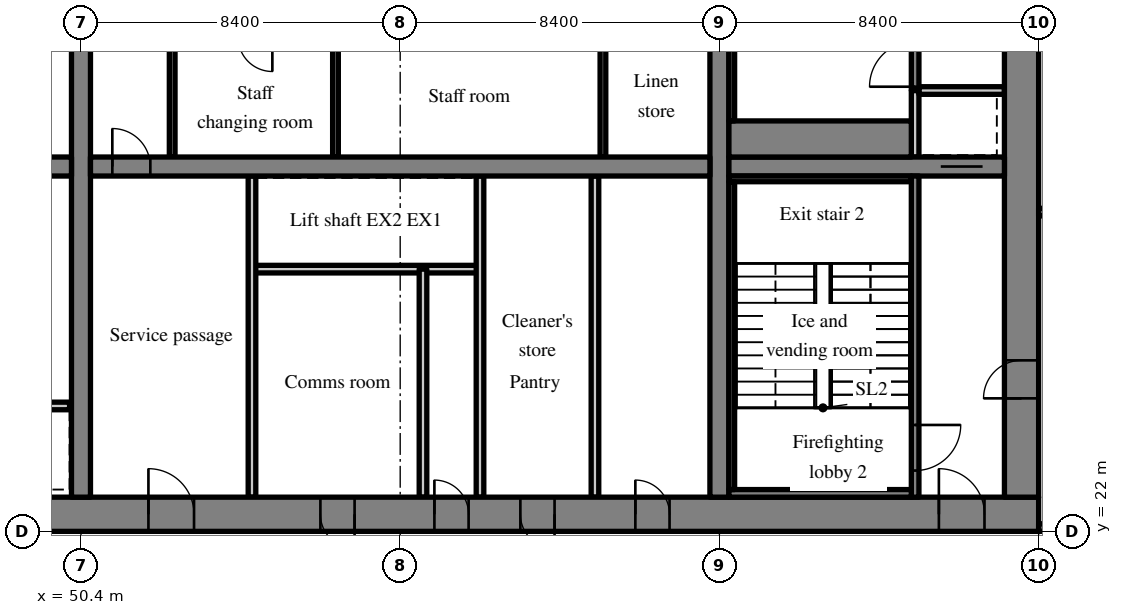
"""IFC4 building model, lengths in metres.
Left out: names, types, materials, properties, quantities, classifications, styles, units other than length and angle.
Written with IfcOpenShell. Run it as: python <this file> out.ifc"""

import sys

from ifc_helpers import new_model, si_unit, direction, frame, frame_2d, origin, place, context, subcontext, project, spatial, rectangle, extrude, source, transform, mapped, element, fill, save


model = new_model("IFC4")
c1 = context("Model", 3, precision=1e-05, world=origin(), true_north=direction((0.0, 1.0)))
c2 = subcontext(c1, "Body", "Model", "MODEL_VIEW")
j1 = project(units=[si_unit("LENGTHUNIT", "METRE"), si_unit("PLANEANGLEUNIT", "RADIAN")], contexts=[c1])
p1 = place(None, origin())
s1 = spatial("IfcSite", under=j1, at=p1, CompositionType="ELEMENT")
p2 = place(p1, origin())
s2 = spatial("IfcBuilding", under=s1, at=p2, CompositionType="ELEMENT")
p3 = place(p2, frame((0.0, 0.0, 137.0)))
s3 = spatial("IfcBuildingStorey", under=s2, at=p3, CompositionType="ELEMENT", Elevation=137.0)
m1 = source(origin(), c2, "Body", "SweptSolid", [
    extrude(rectangle(XDim=50.4, YDim=0.9, at=frame_2d((25.2, 0.0))), origin(), (0.0, 0.0, 1.0), 3.52),
])
p4 = place(p3, frame((25.2, 22.45, 0.0), z_axis=(0.0, 0.0, 1.0), x_axis=(1.0, 0.0, 0.0)))
e1 = element("IfcWall", 1, at=p4, inside=s3, PredefinedType="SHEAR", context=c2, shape_type="MappedRepresentation", body=[
    mapped(m1, transform((0.0, 0.0, 0.0), scale=1.0)),
])
m2 = source(origin(), c2, "Body", "SweptSolid", [
    extrude(rectangle(XDim=1.8, YDim=2.1, at=frame_2d((0.9, 1.05))), frame((0.0, 0.46, 0.0), z_axis=(0.0, -1.0, 0.0), x_axis=(1.0, 0.0, 0.0)), (0.0, 0.0, 1.0), 0.92),
])
p5 = place(p4, frame((15.9, 0.0, 0.0)))
e2 = element("IfcOpeningElement", 2, at=p5, cuts=e1, PredefinedType="OPENING", context=c2, shape_type="MappedRepresentation", body=[
    mapped(m2, transform((0.0, 0.0, 0.0), scale=1.0)),
])
m3 = source(origin(), c2, "Body", "SweptSolid", [
    extrude(rectangle(XDim=1.2, YDim=2.1, at=frame_2d((0.6, 1.05))), frame((0.0, 0.46, 0.0), z_axis=(0.0, -1.0, 0.0), x_axis=(1.0, 0.0, 0.0)), (0.0, 0.0, 1.0), 0.92),
])
p6 = place(p4, frame((26.975, 0.0, 0.0)))
e3 = element("IfcOpeningElement", 3, at=p6, cuts=e1, PredefinedType="OPENING", context=c2, shape_type="MappedRepresentation", body=[
    mapped(m3, transform((0.0, 0.0, 0.0), scale=1.0)),
])
m4 = source(origin(), c2, "Body", "SweptSolid", [
    extrude(rectangle(XDim=0.9, YDim=2.1, at=frame_2d((0.45, 1.05))), frame((0.0, 0.46, 0.0), z_axis=(0.0, -1.0, 0.0), x_axis=(1.0, 0.0, 0.0)), (0.0, 0.0, 1.0), 0.92),
])
p7 = place(p4, frame((34.5, 0.0, 0.0)))
e4 = element("IfcOpeningElement", 4, at=p7, cuts=e1, PredefinedType="OPENING", context=c2, shape_type="MappedRepresentation", body=[
    mapped(m4, transform((0.0, 0.0, 0.0), scale=1.0)),
])
p8 = place(p4, frame((31.5, 0.0, 0.0)))
e5 = element("IfcOpeningElement", 5, at=p8, cuts=e1, PredefinedType="OPENING", context=c2, shape_type="MappedRepresentation", body=[
    mapped(m4, transform((0.0, 0.0, 0.0), scale=1.0)),
])
p9 = place(p4, frame((39.788, 0.0, 0.0)))
e6 = element("IfcOpeningElement", 6, at=p9, cuts=e1, PredefinedType="OPENING", context=c2, shape_type="MappedRepresentation", body=[
    mapped(m4, transform((0.0, 0.0, 0.0), scale=1.0)),
])
p10 = place(p4, frame((36.762, 0.0, 0.0)))
e7 = element("IfcOpeningElement", 7, at=p10, cuts=e1, PredefinedType="OPENING", context=c2, shape_type="MappedRepresentation", body=[
    mapped(m4, transform((0.0, 0.0, 0.0), scale=1.0)),
])
p11 = place(p4, frame((6.45, 0.0, 0.0)))
e8 = element("IfcOpeningElement", 8, at=p11, cuts=e1, PredefinedType="OPENING", context=c2, shape_type="MappedRepresentation", body=[
    mapped(m3, transform((0.0, 0.0, 0.0), scale=1.0)),
])
p12 = place(p4, frame((47.775, 0.0, 0.0)))
e9 = element("IfcOpeningElement", 9, at=p12, cuts=e1, PredefinedType="OPENING", context=c2, shape_type="MappedRepresentation", body=[
    mapped(m3, transform((0.0, 0.0, 0.0), scale=1.0)),
])
m5 = source(origin(), c2, "Body", "SweptSolid", [
    extrude(rectangle(XDim=18.2, YDim=0.9, at=frame_2d((9.1, 0.0))), origin(), (0.0, 0.0, 1.0), 3.52),
])
p13 = place(p3, frame((75.15, 22.9, 0.0), z_axis=(0.0, 0.0, 1.0), x_axis=(0.0, 1.0, 0.0)))
e10 = element("IfcWall", 10, at=p13, inside=s3, PredefinedType="SHEAR", context=c2, shape_type="MappedRepresentation", body=[
    mapped(m5, transform((0.0, 0.0, 0.0), scale=1.0)),
])
m6 = source(origin(), c2, "Body", "SweptSolid", [
    extrude(rectangle(XDim=1.0, YDim=2.1, at=frame_2d((0.5, 1.05))), frame((0.0, 0.46, 0.0), z_axis=(0.0, -1.0, 0.0), x_axis=(1.0, 0.0, 0.0)), (0.0, 0.0, 1.0), 0.92),
])
p14 = place(p13, frame((2.6, 0.0, 0.0)))
e11 = element("IfcOpeningElement", 11, at=p14, cuts=e10, PredefinedType="OPENING", context=c2, shape_type="MappedRepresentation", body=[
    mapped(m6, transform((0.0, 0.0, 0.0), scale=1.0)),
])
p15 = place(p13, frame((12.5, 0.0, 0.0)))
e12 = element("IfcOpeningElement", 12, at=p15, cuts=e10, PredefinedType="OPENING", context=c2, shape_type="MappedRepresentation", body=[
    mapped(m3, transform((0.0, 0.0, 0.0), scale=1.0)),
])
m7 = source(origin(), c2, "Body", "SweptSolid", [
    extrude(rectangle(XDim=18.2, YDim=0.5, at=frame_2d((9.1, 0.0))), origin(), (0.0, 0.0, 1.0), 3.52),
])
p16 = place(p3, frame((50.4, 22.9, 0.0), z_axis=(0.0, 0.0, 1.0), x_axis=(0.0, 1.0, 0.0)))
e13 = element("IfcWall", 13, at=p16, inside=s3, PredefinedType="SHEAR", context=c2, shape_type="MappedRepresentation", body=[
    mapped(m7, transform((0.0, 0.0, 0.0), scale=1.0)),
])
m8 = source(origin(), c2, "Body", "SweptSolid", [
    extrude(rectangle(XDim=1.1, YDim=2.1, at=frame_2d((0.55, 1.05))), frame((0.0, 0.26, 0.0), z_axis=(0.0, -1.0, 0.0), x_axis=(1.0, 0.0, 0.0)), (0.0, 0.0, 1.0), 0.52),
])
p17 = place(p16, frame((12.55, 0.0, 0.0)))
e14 = element("IfcOpeningElement", 14, at=p17, cuts=e13, PredefinedType="OPENING", context=c2, shape_type="MappedRepresentation", body=[
    mapped(m8, transform((0.0, 0.0, 0.0), scale=1.0)),
])
p18 = place(p3, frame((67.2, 22.9, 0.0), z_axis=(0.0, 0.0, 1.0), x_axis=(0.0, 1.0, 0.0)))
e15 = element("IfcWall", 15, at=p18, inside=s3, PredefinedType="SHEAR", context=c2, shape_type="MappedRepresentation", body=[
    mapped(m7, transform((0.0, 0.0, 0.0), scale=1.0)),
])
m9 = source(origin(), c2, "Body", "SweptSolid", [
    extrude(rectangle(XDim=16.3, YDim=0.5, at=frame_2d((8.15, 0.0))), origin(), (0.0, 0.0, 1.0), 3.52),
])
p19 = place(p3, frame((33.85, 31.6, 0.0), z_axis=(0.0, 0.0, 1.0), x_axis=(1.0, 0.0, 0.0)))
e16 = element("IfcWall", 16, at=p19, inside=s3, PredefinedType="SHEAR", context=c2, shape_type="MappedRepresentation", body=[
    mapped(m9, transform((0.0, 0.0, 0.0), scale=1.0)),
])
m10 = source(origin(), c2, "Body", "SweptSolid", [
    extrude(rectangle(XDim=1.0, YDim=2.1, at=frame_2d((0.5, 1.05))), frame((0.0, 0.26, 0.0), z_axis=(0.0, -1.0, 0.0), x_axis=(1.0, 0.0, 0.0)), (0.0, 0.0, 1.0), 0.52),
])
p20 = place(p19, frame((14.725, 0.0, 0.0)))
e17 = element("IfcOpeningElement", 17, at=p20, cuts=e16, PredefinedType="OPENING", context=c2, shape_type="MappedRepresentation", body=[
    mapped(m10, transform((0.0, 0.0, 0.0), scale=1.0)),
])
m11 = source(origin(), c2, "Body", "SweptSolid", [
    extrude(rectangle(XDim=16.3, YDim=0.5, at=frame_2d((8.15, 0.0))), origin(), (0.0, 0.0, 1.0), 3.52),
])
p21 = place(p3, frame((50.65, 31.6, 0.0), z_axis=(0.0, 0.0, 1.0), x_axis=(1.0, 0.0, 0.0)))
e18 = element("IfcWall", 18, at=p21, inside=s3, PredefinedType="SHEAR", context=c2, shape_type="MappedRepresentation", body=[
    mapped(m11, transform((0.0, 0.0, 0.0), scale=1.0)),
])
p22 = place(p21, frame((0.575, 0.0, 0.0)))
e19 = element("IfcOpeningElement", 19, at=p22, cuts=e18, PredefinedType="OPENING", context=c2, shape_type="MappedRepresentation", body=[
    mapped(m10, transform((0.0, 0.0, 0.0), scale=1.0)),
])
m12 = source(origin(), c2, "Body", "SweptSolid", [
    extrude(rectangle(XDim=7.25, YDim=0.5, at=frame_2d((3.625, 0.0))), origin(), (0.0, 0.0, 1.0), 3.52),
])
p23 = place(p3, frame((67.45, 31.6, 0.0), z_axis=(0.0, 0.0, 1.0), x_axis=(1.0, 0.0, 0.0)))
e20 = element("IfcWall", 20, at=p23, inside=s3, PredefinedType="SHEAR", context=c2, shape_type="MappedRepresentation", body=[
    mapped(m12, transform((0.0, 0.0, 0.0), scale=1.0)),
])
p24 = place(p23, frame((5.575, 0.0, 0.0)))
e21 = element("IfcOpeningElement", 21, at=p24, cuts=e20, PredefinedType="OPENING", context=c2, shape_type="MappedRepresentation", body=[
    mapped(m8, transform((0.0, 0.0, 0.0), scale=1.0)),
])
m13 = source(origin(), c2, "Body", "SweptSolid", [
    extrude(rectangle(XDim=6.0, YDim=0.2, at=frame_2d((3.0, 0.0))), origin(), (0.0, 0.0, 1.0), 3.52),
])
p25 = place(p3, frame((44.1, 25.3, 0.0), z_axis=(0.0, 0.0, 1.0), x_axis=(1.0, 0.0, 0.0)))
e22 = element("IfcWall", 22, at=p25, inside=s3, PredefinedType="SOLIDWALL", context=c2, shape_type="MappedRepresentation", body=[
    mapped(m13, transform((0.0, 0.0, 0.0), scale=1.0)),
])
m14 = source(origin(), c2, "Body", "SweptSolid", [
    extrude(rectangle(XDim=1.1, YDim=2.1, at=frame_2d((0.55, 1.05))), frame((0.0, 0.11, 0.0), z_axis=(0.0, -1.0, 0.0), x_axis=(1.0, 0.0, 0.0)), (0.0, 0.0, 1.0), 0.22),
])
p26 = place(p25, frame((0.95, 0.0, 0.0)))
e23 = element("IfcOpeningElement", 23, at=p26, cuts=e22, PredefinedType="OPENING", context=c2, shape_type="MappedRepresentation", body=[
    mapped(m14, transform((0.0, 0.0, 0.0), scale=1.0)),
])
p27 = place(p25, frame((3.95, 0.0, 0.0)))
e24 = element("IfcOpeningElement", 24, at=p27, cuts=e22, PredefinedType="OPENING", context=c2, shape_type="MappedRepresentation", body=[
    mapped(m14, transform((0.0, 0.0, 0.0), scale=1.0)),
])
p28 = place(p3, frame((60.9, 28.9, 0.0), z_axis=(0.0, 0.0, 1.0), x_axis=(-1.0, 0.0, 0.0)))
e25 = element("IfcWall", 25, at=p28, inside=s3, PredefinedType="SOLIDWALL", context=c2, shape_type="MappedRepresentation", body=[
    mapped(m13, transform((0.0, 0.0, 0.0), scale=1.0)),
])
m15 = source(origin(), c2, "Body", "SweptSolid", [
    extrude(rectangle(XDim=8.45, YDim=0.2, at=frame_2d((4.225, 0.0))), origin(), (0.0, 0.0, 1.0), 3.52),
])
for number, where, z_axis, x_axis in (
    (26, (54.9, 22.9, 0.0), (0.0, 0.0, 1.0), (0.0, 1.0, 0.0)),
    (27, (60.9, 22.9, 0.0), (0.0, 0.0, 1.0), (0.0, 1.0, 0.0)),
):
    element("IfcWall", number, at=place(p3, frame(where, z_axis=z_axis, x_axis=x_axis)), inside=s3, PredefinedType="PARTITIONING", context=c2, shape_type="MappedRepresentation", body=[
        mapped(m15, transform((0.0, 0.0, 0.0), scale=1.0)),
    ])
p29 = place(p3, frame((59.4, 22.9, 0.0), z_axis=(0.0, 0.0, 1.0), x_axis=(0.0, 1.0, 0.0)))
e28 = element("IfcWall", 28, at=p29, inside=s3, PredefinedType="PARTITIONING", context=c2, shape_type="MappedRepresentation", body=[
    mapped(m13, transform((0.0, 0.0, 0.0), scale=1.0)),
])
p30 = place(p3, frame((63.925, 22.9, 0.0), z_axis=(0.0, 0.0, 1.0), x_axis=(0.0, 1.0, 0.0)))
e29 = element("IfcWall", 29, at=p30, inside=s3, PredefinedType="PARTITIONING", context=c2, shape_type="MappedRepresentation", body=[
    mapped(m15, transform((0.0, 0.0, 0.0), scale=1.0)),
])
m16 = source(origin(), c2, "Body", "SweptSolid", [
    extrude(rectangle(XDim=3.15, YDim=0.15, at=frame_2d((1.575, 0.0))), origin(), (0.0, 0.0, 1.0), 3.52),
])
for number, where, z_axis, x_axis in (
    (30, (52.8, 31.85, 0.0), (0.0, 0.0, 1.0), (0.0, 1.0, 0.0)),
    (31, (64.135, 31.85, 0.0), (0.0, 0.0, 1.0), (0.0, 1.0, 0.0)),
    (32, (57.097, 31.85, 0.0), (0.0, 0.0, 1.0), (0.0, 1.0, 0.0)),
):
    element("IfcWall", number, at=place(p3, frame(where, z_axis=z_axis, x_axis=x_axis)), inside=s3, PredefinedType="PARTITIONING", context=c2, shape_type="MappedRepresentation", body=[
        mapped(m16, transform((0.0, 0.0, 0.0), scale=1.0)),
    ])
m17 = source(origin(), c2, "Body", "SweptSolid", [
    extrude(rectangle(XDim=8.45, YDim=0.2, at=frame_2d((4.225, 0.0))), origin(), (0.0, 0.0, 1.0), 3.52),
])
p31 = place(p3, frame((72.35, 22.9, 0.0), z_axis=(0.0, 0.0, 1.0), x_axis=(0.0, 1.0, 0.0)))
e33 = element("IfcWall", 33, at=p31, inside=s3, PredefinedType="SOLIDWALL", context=c2, shape_type="MappedRepresentation", body=[
    mapped(m17, transform((0.0, 0.0, 0.0), scale=1.0)),
])
m18 = source(origin(), c2, "Body", "SweptSolid", [
    extrude(rectangle(XDim=1.2, YDim=2.1, at=frame_2d((0.6, 1.05))), frame((0.0, 0.11, 0.0), z_axis=(0.0, -1.0, 0.0), x_axis=(1.0, 0.0, 0.0)), (0.0, 0.0, 1.0), 0.22),
])
p32 = place(p31, frame((0.7, 0.0, 0.0)))
e34 = element("IfcOpeningElement", 34, at=p32, cuts=e33, PredefinedType="OPENING", context=c2, shape_type="MappedRepresentation", body=[
    mapped(m18, transform((0.0, 0.0, 0.0), scale=1.0)),
])
m19 = source(origin(), c2, "Body", "SweptSolid", [
    extrude(rectangle(XDim=1.75, YDim=0.2, at=frame_2d((0.875, 0.0))), origin(), (0.0, 0.0, 1.0), 3.52),
])
p33 = place(p3, frame((72.35, 31.85, 0.0), z_axis=(0.0, 0.0, 1.0), x_axis=(0.0, 1.0, 0.0)))
e35 = element("IfcWall", 35, at=p33, inside=s3, PredefinedType="SOLIDWALL", context=c2, shape_type="MappedRepresentation", body=[
    mapped(m19, transform((0.0, 0.0, 0.0), scale=1.0)),
])
m20 = source(origin(), c2, "Body", "SweptSolid", [
    extrude(rectangle(XDim=2.25, YDim=0.2, at=frame_2d((1.125, 0.0))), origin(), (0.0, 0.0, 1.0), 3.52),
])
p34 = place(p3, frame((72.45, 33.6, 0.0), z_axis=(0.0, 0.0, 1.0), x_axis=(1.0, 0.0, 0.0)))
e36 = element("IfcWall", 36, at=p34, inside=s3, PredefinedType="SOLIDWALL", context=c2, shape_type="MappedRepresentation", body=[
    mapped(m20, transform((0.0, 0.0, 0.0), scale=1.0)),
])
m21 = source(origin(), c2, "Body", "SweptSolid", [
    extrude(rectangle(XDim=7.5, YDim=0.2, at=frame_2d((3.75, 0.0))), origin(), (0.0, 0.0, 1.0), 3.52),
])
p35 = place(p3, frame((72.35, 33.6, 0.0), z_axis=(0.0, 0.0, 1.0), x_axis=(0.0, 1.0, 0.0)))
e37 = element("IfcWall", 37, at=p35, inside=s3, PredefinedType="SOLIDWALL", context=c2, shape_type="MappedRepresentation", body=[
    mapped(m21, transform((0.0, 0.0, 0.0), scale=1.0)),
])
p36 = place(p35, frame((0.1, 0.0, 0.0)))
e38 = element("IfcOpeningElement", 38, at=p36, cuts=e37, PredefinedType="OPENING", context=c2, shape_type="MappedRepresentation", body=[
    mapped(m18, transform((0.0, 0.0, 0.0), scale=1.0)),
])
m22 = source(origin(), c2, "Body", "SweptSolid", [
    extrude(rectangle(XDim=8.225, YDim=0.2, at=frame_2d((4.112, 0.0))), origin(), (0.0, 0.0, 1.0), 3.52),
])
p37 = place(p3, frame((83.825, 22.1, 0.0), z_axis=(0.0, 0.0, 1.0), x_axis=(-1.0, 0.0, 0.0)))
e39 = element("IfcWall", 39, at=p37, inside=s3, PredefinedType="SOLIDWALL", context=c2, shape_type="MappedRepresentation", body=[
    mapped(m22, transform((0.0, 0.0, 0.0), scale=1.0)),
])
p38 = place(p37, frame((6.025, 0.0, 0.0)))
e40 = element("IfcOpeningElement", 40, at=p38, cuts=e39, PredefinedType="OPENING", context=c2, shape_type="MappedRepresentation", body=[
    mapped(m18, transform((0.0, 0.0, 0.0), scale=1.0)),
])
p39 = place(p3, frame((83.825, 30.4, 0.0), z_axis=(0.0, 0.0, 1.0), x_axis=(-1.0, 0.0, 0.0)))
e41 = element("IfcWall", 41, at=p39, inside=s3, PredefinedType="SOLIDWALL", context=c2, shape_type="MappedRepresentation", body=[
    mapped(m22, transform((0.0, 0.0, 0.0), scale=1.0)),
])
m23 = source(origin(), c2, "Body", "SweptSolid", [
    extrude(rectangle(XDim=1.0, YDim=2.1, at=frame_2d((0.5, 1.05))), frame((0.0, 0.11, 0.0), z_axis=(0.0, -1.0, 0.0), x_axis=(1.0, 0.0, 0.0)), (0.0, 0.0, 1.0), 0.22),
])
p40 = place(p39, frame((6.125, 0.0, 0.0)))
e42 = element("IfcOpeningElement", 42, at=p40, cuts=e41, PredefinedType="OPENING", context=c2, shape_type="MappedRepresentation", body=[
    mapped(m23, transform((0.0, 0.0, 0.0), scale=1.0)),
])
m24 = source(origin(), c2, "Body", "SweptSolid", [
    extrude(rectangle(XDim=4.8, YDim=0.2, at=frame_2d((2.4, 0.0))), origin(), (0.0, 0.0, 1.0), 3.52),
])
p41 = place(p3, frame((67.45, 23.0, 0.0), z_axis=(0.0, 0.0, 1.0), x_axis=(1.0, 0.0, 0.0)))
e43 = element("IfcWall", 43, at=p41, inside=s3, PredefinedType="SOLIDWALL", context=c2, shape_type="MappedRepresentation", body=[
    mapped(m24, transform((0.0, 0.0, 0.0), scale=1.0)),
])
m25 = source(origin(), c2, "Body", "SweptSolid", [
    extrude(rectangle(XDim=4.8, YDim=0.15, at=frame_2d((2.4, 0.0))), origin(), (0.0, 0.0, 1.0), 3.52),
])
p42 = place(p3, frame((67.45, 31.275, 0.0), z_axis=(0.0, 0.0, 1.0), x_axis=(1.0, 0.0, 0.0)))
e44 = element("IfcWall", 44, at=p42, inside=s3, PredefinedType="SOLIDWALL", context=c2, shape_type="MappedRepresentation", body=[
    mapped(m25, transform((0.0, 0.0, 0.0), scale=1.0)),
])
m26 = source(origin(), c2, "Body", "SweptSolid", [
    extrude(rectangle(XDim=8.1, YDim=0.15, at=frame_2d((4.05, 0.0))), origin(), (0.0, 0.0, 1.0), 3.52),
])
p43 = place(p3, frame((67.525, 23.1, 0.0), z_axis=(0.0, 0.0, 1.0), x_axis=(0.0, 1.0, 0.0)))
e45 = element("IfcWall", 45, at=p43, inside=s3, PredefinedType="SOLIDWALL", context=c2, shape_type="MappedRepresentation", body=[
    mapped(m26, transform((0.0, 0.0, 0.0), scale=1.0)),
])
m27 = source(origin(), c2, "Body", "SweptSolid", [
    extrude(rectangle(XDim=4.8, YDim=0.95, at=frame_2d((2.4, 0.0))), origin(), (0.0, 0.0, 1.0), 3.52),
])
p44 = place(p3, frame((67.45, 32.325, 0.0), z_axis=(0.0, 0.0, 1.0), x_axis=(1.0, 0.0, 0.0)))
e46 = element("IfcWall", 46, at=p44, inside=s3, PredefinedType="SOLIDWALL", context=c2, shape_type="MappedRepresentation", body=[
    mapped(m27, transform((0.0, 0.0, 0.0), scale=1.0)),
])
p45 = place(p3, frame((67.525, 32.8, 0.0), z_axis=(0.0, 0.0, 1.0), x_axis=(0.0, 1.0, 0.0)))
e47 = element("IfcWall", 47, at=p45, inside=s3, PredefinedType="SOLIDWALL", context=c2, shape_type="MappedRepresentation", body=[
    mapped(m26, transform((0.0, 0.0, 0.0), scale=1.0)),
])
m28 = source(origin(), c2, "Body", "SweptSolid", [
    extrude(rectangle(XDim=1.2, YDim=2.1, at=frame_2d((0.6, 1.05))), frame((0.0, 0.375, 0.0), z_axis=(0.0, -1.0, 0.0), x_axis=(1.0, 0.0, 0.0)), (0.0, 0.0, 1.0), 0.05),
])
p46 = place(p6, origin())
e48 = element("IfcDoor", 48, at=p46, inside=s3, OperationType="SINGLE_SWING_LEFT", PredefinedType="DOOR", context=c2, shape_type="MappedRepresentation", body=[
    mapped(m28, transform((0.0, 0.0, 0.0), scale=1.0)),
])
fill(e3, e48)
m29 = source(origin(), c2, "Body", "SweptSolid", [
    extrude(rectangle(XDim=1.0, YDim=2.1, at=frame_2d((0.5, 1.05))), frame((0.0, 0.025, 0.0), z_axis=(0.0, -1.0, 0.0), x_axis=(1.0, 0.0, 0.0)), (0.0, 0.0, 1.0), 0.05),
])
p47 = place(p22, origin())
e49 = element("IfcDoor", 49, at=p47, inside=s3, OperationType="SINGLE_SWING_LEFT", PredefinedType="DOOR", context=c2, shape_type="MappedRepresentation", body=[
    mapped(m29, transform((0.0, 0.0, 0.0), scale=1.0)),
])
fill(e19, e49)
m30 = source(origin(), c2, "Body", "SweptSolid", [
    extrude(rectangle(XDim=0.9, YDim=2.1, at=frame_2d((0.45, 1.05))), frame((0.0, 0.375, 0.0), z_axis=(0.0, -1.0, 0.0), x_axis=(1.0, 0.0, 0.0)), (0.0, 0.0, 1.0), 0.05),
])
p48 = place(p7, origin())
e50 = element("IfcDoor", 50, at=p48, inside=s3, OperationType="SINGLE_SWING_LEFT", PredefinedType="DOOR", context=c2, shape_type="MappedRepresentation", body=[
    mapped(m30, transform((0.0, 0.0, 0.0), scale=1.0)),
])
fill(e4, e50)
p49 = place(p8, origin())
e51 = element("IfcDoor", 51, at=p49, inside=s3, OperationType="SINGLE_SWING_RIGHT", PredefinedType="DOOR", context=c2, shape_type="MappedRepresentation", body=[
    mapped(m30, transform((0.0, 0.0, 0.0), scale=1.0)),
])
fill(e5, e51)
p50 = place(p9, origin())
e52 = element("IfcDoor", 52, at=p50, inside=s3, OperationType="SINGLE_SWING_LEFT", PredefinedType="DOOR", context=c2, shape_type="MappedRepresentation", body=[
    mapped(m30, transform((0.0, 0.0, 0.0), scale=1.0)),
])
fill(e6, e52)
p51 = place(p10, origin())
e53 = element("IfcDoor", 53, at=p51, inside=s3, OperationType="SINGLE_SWING_RIGHT", PredefinedType="DOOR", context=c2, shape_type="MappedRepresentation", body=[
    mapped(m30, transform((0.0, 0.0, 0.0), scale=1.0)),
])
fill(e7, e53)
m31 = source(origin(), c2, "Body", "SweptSolid", [
    extrude(rectangle(XDim=1.2, YDim=2.1, at=frame_2d((0.6, 1.05))), frame((0.0, 0.025, 0.0), z_axis=(0.0, -1.0, 0.0), x_axis=(1.0, 0.0, 0.0)), (0.0, 0.0, 1.0), 0.05),
])
p52 = place(p32, origin())
e54 = element("IfcDoor", 54, at=p52, inside=s3, OperationType="SINGLE_SWING_RIGHT", PredefinedType="DOOR", context=c2, shape_type="MappedRepresentation", body=[
    mapped(m31, transform((0.0, 0.0, 0.0), scale=1.0)),
])
fill(e34, e54)
p53 = place(p12, origin())
e55 = element("IfcDoor", 55, at=p53, inside=s3, OperationType="SINGLE_SWING_LEFT", PredefinedType="DOOR", context=c2, shape_type="MappedRepresentation", body=[
    mapped(m28, transform((0.0, 0.0, 0.0), scale=1.0)),
])
fill(e9, e55)
m32 = source(origin(), c2, "Body", "SweptSolid", [
    extrude(rectangle(XDim=1.1, YDim=2.1, at=frame_2d((0.55, 1.05))), frame((0.0, 0.025, 0.0), z_axis=(0.0, -1.0, 0.0), x_axis=(1.0, 0.0, 0.0)), (0.0, 0.0, 1.0), 0.05),
])
p54 = place(p24, origin())
e56 = element("IfcDoor", 56, at=p54, inside=s3, OperationType="SLIDING_TO_RIGHT", PredefinedType="DOOR", context=c2, shape_type="MappedRepresentation", body=[
    mapped(m32, transform((0.0, 0.0, 0.0), scale=1.0)),
])
fill(e21, e56)
p55 = place(p14, origin())
e57 = element("IfcDoor", 57, at=p55, inside=s3, OperationType="SINGLE_SWING_LEFT", PredefinedType="DOOR", context=c2, shape_type="MappedRepresentation", body=[
    mapped(m29, transform((0.0, 0.0, 0.0), scale=1.0)),
])
fill(e11, e57)
p56 = place(p36, origin())
e58 = element("IfcDoor", 58, at=p56, inside=s3, OperationType="SINGLE_SWING_LEFT", PredefinedType="DOOR", context=c2, shape_type="MappedRepresentation", body=[
    mapped(m31, transform((0.0, 0.0, 0.0), scale=1.0)),
])
fill(e38, e58)
save(model, sys.argv[1])
